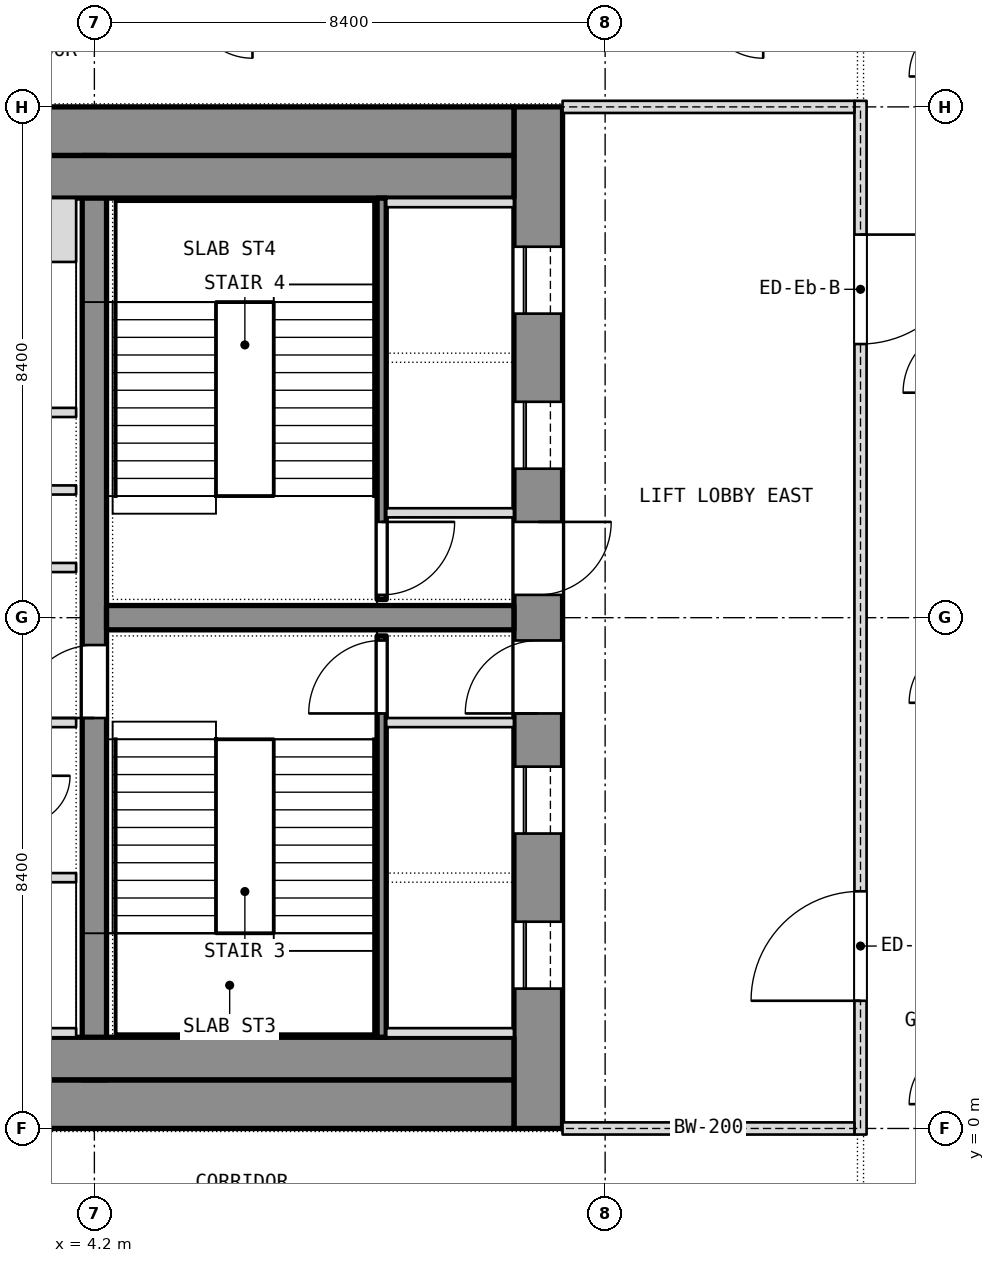
"""IFC4 building model, lengths in metres.
Left out: names, types, materials, properties, quantities, classifications, styles, units other than length and angle.
Written with IfcOpenShell. Run it as: python <this file> out.ifc"""

import sys

from ifc_helpers import new_model, si_unit, direction, frame, frame_2d, origin, place, context, subcontext, project, spatial, rectangle, extrude, element, fill, save


model = new_model("IFC4")
c1 = context("Model", 3, precision=1e-05, world=origin(), true_north=direction((0.0, 1.0)))
c2 = subcontext(c1, "Body", "Model", "MODEL_VIEW")
j1 = project(units=[si_unit("LENGTHUNIT", "METRE"), si_unit("PLANEANGLEUNIT", "RADIAN")], contexts=[c1])
p1 = place(None, origin())
s1 = spatial("IfcSite", under=j1, at=p1, CompositionType="ELEMENT")
p2 = place(p1, origin())
s2 = spatial("IfcBuilding", under=s1, at=p2, CompositionType="ELEMENT")
p3 = place(p2, frame((0.0, 0.0, 241.7)))
s3 = spatial("IfcBuildingStorey", under=s2, at=p3, CompositionType="ELEMENT", Elevation=241.7)
p4 = place(p3, frame((11.5, 0.0, 0.0), z_axis=(0.0, 0.0, 1.0), x_axis=(0.0, 1.0, 0.0)))
e1 = element("IfcWall", 1, at=p4, inside=s3, PredefinedType="SHEAR", context=c2, shape_type="SweptSolid", body=[
    extrude(rectangle(XDim=16.8, YDim=0.8, at=frame_2d((8.4, 0.0))), origin(), (0.0, 0.0, 1.0), 3.6),
])
p5 = place(p4, frame((2.3, 0.0, 0.0)))
e2 = element("IfcOpeningElement", 2, at=p5, cuts=e1, PredefinedType="OPENING", context=c2, shape_type="SweptSolid", body=[
    extrude(rectangle(XDim=1.1, YDim=2.1, at=frame_2d((0.55, 1.05))), frame((0.0, 0.4, 0.0), z_axis=(0.0, -1.0, 0.0), x_axis=(1.0, 0.0, 0.0)), (0.0, 0.0, 1.0), 0.8),
])
p6 = place(p4, frame((4.85, 0.0, 0.0)))
e3 = element("IfcOpeningElement", 3, at=p6, cuts=e1, PredefinedType="OPENING", context=c2, shape_type="SweptSolid", body=[
    extrude(rectangle(XDim=1.1, YDim=2.1, at=frame_2d((0.55, 1.05))), frame((0.0, 0.4, 0.0), z_axis=(0.0, -1.0, 0.0), x_axis=(1.0, 0.0, 0.0)), (0.0, 0.0, 1.0), 0.8),
])
p7 = place(p4, frame((6.825, 0.0, 0.0)))
e4 = element("IfcOpeningElement", 4, at=p7, cuts=e1, PredefinedType="OPENING", context=c2, shape_type="SweptSolid", body=[
    extrude(rectangle(XDim=1.2, YDim=2.1, at=frame_2d((0.6, 1.05))), frame((0.0, 0.4, 0.0), z_axis=(0.0, -1.0, 0.0), x_axis=(1.0, 0.0, 0.0)), (0.0, 0.0, 1.0), 0.8),
])
p8 = place(p4, frame((13.4, 0.0, 0.0)))
e5 = element("IfcOpeningElement", 5, at=p8, cuts=e1, PredefinedType="OPENING", context=c2, shape_type="SweptSolid", body=[
    extrude(rectangle(XDim=1.1, YDim=2.1, at=frame_2d((0.55, 1.05))), frame((0.0, 0.4, 0.0), z_axis=(0.0, -1.0, 0.0), x_axis=(1.0, 0.0, 0.0)), (0.0, 0.0, 1.0), 0.8),
])
p9 = place(p4, frame((10.85, 0.0, 0.0)))
e6 = element("IfcOpeningElement", 6, at=p9, cuts=e1, PredefinedType="OPENING", context=c2, shape_type="SweptSolid", body=[
    extrude(rectangle(XDim=1.1, YDim=2.1, at=frame_2d((0.55, 1.05))), frame((0.0, 0.4, 0.0), z_axis=(0.0, -1.0, 0.0), x_axis=(1.0, 0.0, 0.0)), (0.0, 0.0, 1.0), 0.8),
])
p10 = place(p4, frame((8.775, 0.0, 0.0)))
e7 = element("IfcOpeningElement", 7, at=p10, cuts=e1, PredefinedType="OPENING", context=c2, shape_type="SweptSolid", body=[
    extrude(rectangle(XDim=1.2, YDim=2.1, at=frame_2d((0.6, 1.05))), frame((0.0, 0.4, 0.0), z_axis=(0.0, -1.0, 0.0), x_axis=(1.0, 0.0, 0.0)), (0.0, 0.0, 1.0), 0.8),
])
for number, where, z_axis, x_axis in (
    (8, (-11.1, 0.4, 0.0), (0.0, 0.0, 1.0), (1.0, 0.0, 0.0)),
    (9, (-11.1, 16.4, 0.0), (0.0, 0.0, 1.0), (1.0, 0.0, 0.0)),
):
    element("IfcWall", number, at=place(p3, frame(where, z_axis=z_axis, x_axis=x_axis)), inside=s3, PredefinedType="SHEAR", context=c2, shape_type="SweptSolid", body=[
        extrude(rectangle(XDim=22.2, YDim=0.8, at=frame_2d((11.1, 0.0))), origin(), (0.0, 0.0, 1.0), 3.6),
    ])
p11 = place(p3, frame((4.2, 0.8, 0.0), z_axis=(0.0, 0.0, 1.0), x_axis=(0.0, 1.0, 0.0)))
e10 = element("IfcWall", 10, at=p11, inside=s3, PredefinedType="SHEAR", context=c2, shape_type="SweptSolid", body=[
    extrude(rectangle(XDim=15.2, YDim=0.4, at=frame_2d((7.6, 0.0))), origin(), (0.0, 0.0, 1.0), 3.6),
])
p12 = place(p11, frame((5.95, 0.0, 0.0)))
e11 = element("IfcOpeningElement", 11, at=p12, cuts=e10, PredefinedType="OPENING", context=c2, shape_type="SweptSolid", body=[
    extrude(rectangle(XDim=1.2, YDim=2.1, at=frame_2d((0.6, 1.05))), frame((0.0, 0.2, 0.0), z_axis=(0.0, -1.0, 0.0), x_axis=(1.0, 0.0, 0.0)), (0.0, 0.0, 1.0), 0.4),
])
p13 = place(p3, frame((4.4, 8.4, 0.0), z_axis=(0.0, 0.0, 1.0), x_axis=(1.0, 0.0, 0.0)))
e12 = element("IfcWall", 12, at=p13, inside=s3, PredefinedType="SHEAR", context=c2, shape_type="SweptSolid", body=[
    extrude(rectangle(XDim=6.7, YDim=0.4, at=frame_2d((3.35, 0.0))), origin(), (0.0, 0.0, 1.0), 3.6),
])
for number, where, z_axis, x_axis in (
    (13, (-11.1, 1.15, 0.0), (0.0, 0.0, 1.0), (1.0, 0.0, 0.0)),
    (14, (-11.1, 15.65, 0.0), (0.0, 0.0, 1.0), (1.0, 0.0, 0.0)),
):
    element("IfcWall", number, at=place(p3, frame(where, z_axis=z_axis, x_axis=x_axis)), inside=s3, PredefinedType="PARTITIONING", context=c2, shape_type="SweptSolid", body=[
        extrude(rectangle(XDim=22.2, YDim=0.7, at=frame_2d((11.1, 0.0))), origin(), (0.0, 0.0, 1.0), 3.34),
    ])
p14 = place(p3, frame((8.925, 1.5, 0.0), z_axis=(0.0, 0.0, 1.0), x_axis=(0.0, 1.0, 0.0)))
e15 = element("IfcWall", 15, at=p14, inside=s3, PredefinedType="SHEAR", context=c2, shape_type="SweptSolid", body=[
    extrude(rectangle(XDim=6.6, YDim=0.15, at=frame_2d((3.3, 0.0))), origin(), (0.0, 0.0, 1.0), 3.34),
])
p15 = place(p14, frame((5.325, 0.0, 0.0)))
e16 = element("IfcOpeningElement", 16, at=p15, cuts=e15, PredefinedType="OPENING", context=c2, shape_type="SweptSolid", body=[
    extrude(rectangle(XDim=1.2, YDim=2.1, at=frame_2d((0.6, 1.05))), frame((0.0, 0.075, 0.0), z_axis=(0.0, -1.0, 0.0), x_axis=(1.0, 0.0, 0.0)), (0.0, 0.0, 1.0), 0.15),
])
for number, where, z_axis, x_axis in (
    (17, (9.0, 6.675, 0.0), (0.0, 0.0, 1.0), (1.0, 0.0, 0.0)),
    (18, (9.0, 1.575, 0.0), (0.0, 0.0, 1.0), (1.0, 0.0, 0.0)),
):
    element("IfcWall", number, at=place(p3, frame(where, z_axis=z_axis, x_axis=x_axis)), inside=s3, PredefinedType="SHEAR", context=c2, shape_type="SweptSolid", body=[
        extrude(rectangle(XDim=2.1, YDim=0.15, at=frame_2d((1.05, 0.0))), origin(), (0.0, 0.0, 1.0), 3.6),
    ])
p16 = place(p3, frame((8.925, 8.7, 0.0), z_axis=(0.0, 0.0, 1.0), x_axis=(0.0, 1.0, 0.0)))
e19 = element("IfcWall", 19, at=p16, inside=s3, PredefinedType="SHEAR", context=c2, shape_type="SweptSolid", body=[
    extrude(rectangle(XDim=6.6, YDim=0.15, at=frame_2d((3.3, 0.0))), origin(), (0.0, 0.0, 1.0), 3.34),
])
p17 = place(p16, frame((0.075, 0.0, 0.0)))
e20 = element("IfcOpeningElement", 20, at=p17, cuts=e19, PredefinedType="OPENING", context=c2, shape_type="SweptSolid", body=[
    extrude(rectangle(XDim=1.2, YDim=2.1, at=frame_2d((0.6, 1.05))), frame((0.0, 0.075, 0.0), z_axis=(0.0, -1.0, 0.0), x_axis=(1.0, 0.0, 0.0)), (0.0, 0.0, 1.0), 0.15),
])
for number, where, z_axis, x_axis in (
    (21, (9.0, 10.125, 0.0), (0.0, 0.0, 1.0), (1.0, 0.0, 0.0)),
    (22, (9.0, 15.225, 0.0), (0.0, 0.0, 1.0), (1.0, 0.0, 0.0)),
):
    element("IfcWall", number, at=place(p3, frame(where, z_axis=z_axis, x_axis=x_axis)), inside=s3, PredefinedType="SHEAR", context=c2, shape_type="SweptSolid", body=[
        extrude(rectangle(XDim=2.1, YDim=0.15, at=frame_2d((1.05, 0.0))), origin(), (0.0, 0.0, 1.0), 3.6),
    ])
p18 = place(p3, frame((-3.9, 4.125, 0.0), z_axis=(0.0, 0.0, 1.0), x_axis=(1.0, 0.0, 0.0)))
e23 = element("IfcWall", 23, at=p18, inside=s3, PredefinedType="PARTITIONING", context=c2, shape_type="SweptSolid", body=[
    extrude(rectangle(XDim=7.8, YDim=0.15, at=frame_2d((3.9, 0.0))), origin(), (0.0, 0.0, 1.0), 3.34),
])
p19 = place(p18, frame((3.75, 0.0, 0.0)))
e24 = element("IfcOpeningElement", 24, at=p19, cuts=e23, PredefinedType="OPENING", context=c2, shape_type="SweptSolid", body=[
    extrude(rectangle(XDim=1.2, YDim=2.1, at=frame_2d((0.6, 1.05))), frame((0.0, 0.075, 0.0), z_axis=(0.0, -1.0, 0.0), x_axis=(1.0, 0.0, 0.0)), (0.0, 0.0, 1.0), 0.15),
])
p20 = place(p3, frame((-3.9, 11.775, 0.0), z_axis=(0.0, 0.0, 1.0), x_axis=(1.0, 0.0, 0.0)))
e25 = element("IfcWall", 25, at=p20, inside=s3, PredefinedType="PARTITIONING", context=c2, shape_type="SweptSolid", body=[
    extrude(rectangle(XDim=7.8, YDim=0.15, at=frame_2d((3.9, 0.0))), origin(), (0.0, 0.0, 1.0), 3.34),
])
p21 = place(p20, frame((3.3, 0.0, 0.0)))
e26 = element("IfcOpeningElement", 26, at=p21, cuts=e25, PredefinedType="OPENING", context=c2, shape_type="SweptSolid", body=[
    extrude(rectangle(XDim=1.2, YDim=2.1, at=frame_2d((0.6, 1.05))), frame((0.0, 0.075, 0.0), z_axis=(0.0, -1.0, 0.0), x_axis=(1.0, 0.0, 0.0)), (0.0, 0.0, 1.0), 0.15),
])
p22 = place(p3, frame((1.65, 1.575, 0.0), z_axis=(0.0, 0.0, 1.0), x_axis=(1.0, 0.0, 0.0)))
e27 = element("IfcWall", 27, at=p22, inside=s3, PredefinedType="SHEAR", context=c2, shape_type="SweptSolid", body=[
    extrude(rectangle(XDim=2.25, YDim=0.15, at=frame_2d((1.125, 0.0))), origin(), (0.0, 0.0, 1.0), 3.6),
])
p23 = place(p3, frame((1.65, 14.775, 0.0), z_axis=(0.0, 0.0, 1.0), x_axis=(1.0, 0.0, 0.0)))
e28 = element("IfcWall", 28, at=p23, inside=s3, PredefinedType="SHEAR", context=c2, shape_type="SweptSolid", body=[
    extrude(rectangle(XDim=2.25, YDim=1.05, at=frame_2d((1.125, 0.0))), origin(), (0.0, 0.0, 1.0), 3.6),
])
for number, where, z_axis, x_axis in (
    (29, (1.65, 6.675, 0.0), (0.0, 0.0, 1.0), (1.0, 0.0, 0.0)),
    (30, (1.65, 9.225, 0.0), (0.0, 0.0, 1.0), (1.0, 0.0, 0.0)),
):
    element("IfcWall", number, at=place(p3, frame(where, z_axis=z_axis, x_axis=x_axis)), inside=s3, PredefinedType="PARTITIONING", context=c2, shape_type="SweptSolid", body=[
        extrude(rectangle(XDim=2.25, YDim=0.15, at=frame_2d((1.125, 0.0))), origin(), (0.0, 0.0, 1.0), 3.34),
    ])
p24 = place(p3, frame((1.8, 10.5, 0.0), z_axis=(0.0, 0.0, 1.0), x_axis=(1.0, 0.0, 0.0)))
e31 = element("IfcWall", 31, at=p24, inside=s3, PredefinedType="PARTITIONING", context=c2, shape_type="SweptSolid", body=[
    extrude(rectangle(XDim=2.1, YDim=0.15, at=frame_2d((1.05, 0.0))), origin(), (0.0, 0.0, 1.0), 3.34),
])
p25 = place(p3, frame((16.8, -0.1, 0.0), z_axis=(0.0, 0.0, 1.0), x_axis=(0.0, 1.0, 0.0)))
e32 = element("IfcWall", 32, at=p25, inside=s3, PredefinedType="PARTITIONING", context=c2, shape_type="SweptSolid", body=[
    extrude(rectangle(XDim=17.0, YDim=0.2, at=frame_2d((8.5, 0.0))), origin(), (0.0, 0.0, 1.0), 3.34),
])
p26 = place(p25, frame((2.2, 0.0, 0.0)))
e33 = element("IfcOpeningElement", 33, at=p26, cuts=e32, PredefinedType="OPENING", context=c2, shape_type="SweptSolid", body=[
    extrude(rectangle(XDim=1.8, YDim=2.1, at=frame_2d((0.9, 1.05))), frame((0.0, 0.1, 0.0), z_axis=(0.0, -1.0, 0.0), x_axis=(1.0, 0.0, 0.0)), (0.0, 0.0, 1.0), 0.2),
])
p27 = place(p25, frame((13.0, 0.0, 0.0)))
e34 = element("IfcOpeningElement", 34, at=p27, cuts=e32, PredefinedType="OPENING", context=c2, shape_type="SweptSolid", body=[
    extrude(rectangle(XDim=1.8, YDim=2.1, at=frame_2d((0.9, 1.05))), frame((0.0, 0.1, 0.0), z_axis=(0.0, -1.0, 0.0), x_axis=(1.0, 0.0, 0.0)), (0.0, 0.0, 1.0), 0.2),
])
for number, where, z_axis, x_axis in (
    (35, (11.9, 0.0, 0.0), (0.0, 0.0, 1.0), (1.0, 0.0, 0.0)),
    (36, (11.9, 16.8, 0.0), (0.0, 0.0, 1.0), (1.0, 0.0, 0.0)),
):
    element("IfcWall", number, at=place(p3, frame(where, z_axis=z_axis, x_axis=x_axis)), inside=s3, PredefinedType="PARTITIONING", context=c2, shape_type="SweptSolid", body=[
        extrude(rectangle(XDim=4.8, YDim=0.2, at=frame_2d((2.4, 0.0))), origin(), (0.0, 0.0, 1.0), 2.94),
    ])
p28 = place(p5, origin())
e37 = element("IfcDoor", 37, at=p28, inside=s3, OperationType="SLIDING_TO_LEFT", PredefinedType="DOOR", context=c2, shape_type="SweptSolid", body=[
    extrude(rectangle(XDim=1.1, YDim=2.1, at=frame_2d((0.55, 1.05))), frame((0.0, 0.025, 0.0), z_axis=(0.0, -1.0, 0.0), x_axis=(1.0, 0.0, 0.0)), (0.0, 0.0, 1.0), 0.05),
])
fill(e2, e37)
p29 = place(p6, origin())
e38 = element("IfcDoor", 38, at=p29, inside=s3, OperationType="SLIDING_TO_LEFT", PredefinedType="DOOR", context=c2, shape_type="SweptSolid", body=[
    extrude(rectangle(XDim=1.1, YDim=2.1, at=frame_2d((0.55, 1.05))), frame((0.0, 0.025, 0.0), z_axis=(0.0, -1.0, 0.0), x_axis=(1.0, 0.0, 0.0)), (0.0, 0.0, 1.0), 0.05),
])
fill(e3, e38)
p30 = place(p7, origin())
e39 = element("IfcDoor", 39, at=p30, inside=s3, OperationType="SINGLE_SWING_LEFT", PredefinedType="DOOR", context=c2, shape_type="SweptSolid", body=[
    extrude(rectangle(XDim=1.2, YDim=2.1, at=frame_2d((0.6, 1.05))), frame((0.0, 0.025, 0.0), z_axis=(0.0, -1.0, 0.0), x_axis=(1.0, 0.0, 0.0)), (0.0, 0.0, 1.0), 0.05),
])
fill(e4, e39)
p31 = place(p15, origin())
e40 = element("IfcDoor", 40, at=p31, inside=s3, OperationType="SINGLE_SWING_LEFT", PredefinedType="DOOR", context=c2, shape_type="SweptSolid", body=[
    extrude(rectangle(XDim=1.2, YDim=2.1, at=frame_2d((0.6, 1.05))), frame((0.0, 0.025, 0.0), z_axis=(0.0, -1.0, 0.0), x_axis=(1.0, 0.0, 0.0)), (0.0, 0.0, 1.0), 0.05),
])
fill(e16, e40)
p32 = place(p8, origin())
e41 = element("IfcDoor", 41, at=p32, inside=s3, OperationType="SLIDING_TO_LEFT", PredefinedType="DOOR", context=c2, shape_type="SweptSolid", body=[
    extrude(rectangle(XDim=1.1, YDim=2.1, at=frame_2d((0.55, 1.05))), frame((0.0, 0.025, 0.0), z_axis=(0.0, -1.0, 0.0), x_axis=(1.0, 0.0, 0.0)), (0.0, 0.0, 1.0), 0.05),
])
fill(e5, e41)
p33 = place(p9, origin())
e42 = element("IfcDoor", 42, at=p33, inside=s3, OperationType="SLIDING_TO_LEFT", PredefinedType="DOOR", context=c2, shape_type="SweptSolid", body=[
    extrude(rectangle(XDim=1.1, YDim=2.1, at=frame_2d((0.55, 1.05))), frame((0.0, 0.025, 0.0), z_axis=(0.0, -1.0, 0.0), x_axis=(1.0, 0.0, 0.0)), (0.0, 0.0, 1.0), 0.05),
])
fill(e6, e42)
p34 = place(p10, origin())
e43 = element("IfcDoor", 43, at=p34, inside=s3, OperationType="SINGLE_SWING_LEFT", PredefinedType="DOOR", context=c2, shape_type="SweptSolid", body=[
    extrude(rectangle(XDim=1.2, YDim=2.1, at=frame_2d((0.6, 1.05))), frame((0.0, 0.025, 0.0), z_axis=(0.0, -1.0, 0.0), x_axis=(1.0, 0.0, 0.0)), (0.0, 0.0, 1.0), 0.05),
])
fill(e7, e43)
p35 = place(p17, origin())
e44 = element("IfcDoor", 44, at=p35, inside=s3, OperationType="SINGLE_SWING_LEFT", PredefinedType="DOOR", context=c2, shape_type="SweptSolid", body=[
    extrude(rectangle(XDim=1.2, YDim=2.1, at=frame_2d((0.6, 1.05))), frame((0.0, 0.025, 0.0), z_axis=(0.0, -1.0, 0.0), x_axis=(1.0, 0.0, 0.0)), (0.0, 0.0, 1.0), 0.05),
])
fill(e20, e44)
p36 = place(p12, origin())
e45 = element("IfcDoor", 45, at=p36, inside=s3, OperationType="SINGLE_SWING_LEFT", PredefinedType="DOOR", context=c2, shape_type="SweptSolid", body=[
    extrude(rectangle(XDim=1.2, YDim=2.1, at=frame_2d((0.6, 1.05))), frame((0.0, 0.025, 0.0), z_axis=(0.0, -1.0, 0.0), x_axis=(1.0, 0.0, 0.0)), (0.0, 0.0, 1.0), 0.05),
])
fill(e11, e45)
p37 = place(p26, origin())
e46 = element("IfcDoor", 46, at=p37, inside=s3, OperationType="DOUBLE_DOOR_SINGLE_SWING", PredefinedType="DOOR", context=c2, shape_type="SweptSolid", body=[
    extrude(rectangle(XDim=1.8, YDim=2.1, at=frame_2d((0.9, 1.05))), frame((0.0, 0.025, 0.0), z_axis=(0.0, -1.0, 0.0), x_axis=(1.0, 0.0, 0.0)), (0.0, 0.0, 1.0), 0.05),
])
fill(e33, e46)
p38 = place(p27, origin())
e47 = element("IfcDoor", 47, at=p38, inside=s3, OperationType="DOUBLE_DOOR_SINGLE_SWING", PredefinedType="DOOR", context=c2, shape_type="SweptSolid", body=[
    extrude(rectangle(XDim=1.8, YDim=2.1, at=frame_2d((0.9, 1.05))), frame((0.0, 0.025, 0.0), z_axis=(0.0, -1.0, 0.0), x_axis=(1.0, 0.0, 0.0)), (0.0, 0.0, 1.0), 0.05),
])
fill(e34, e47)
save(model, sys.argv[1])
